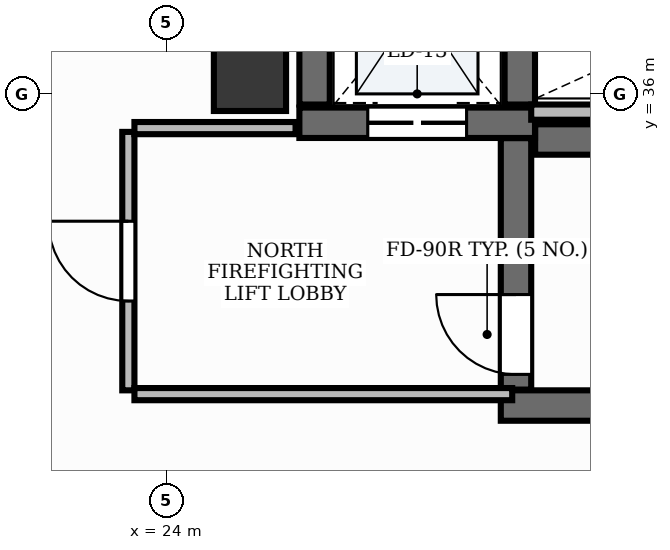
"""IFC4 building model, lengths in metres.
Left out: names, types, materials, properties, quantities, classifications, styles, units other than length and angle.
Written with IfcOpenShell. Run it as: python <this file> out.ifc"""

import sys

from ifc_helpers import new_model, si_unit, direction, frame, frame_2d, origin, origin_2d, place, context, subcontext, project, spatial, rectangle, extrude, element, fill, save


model = new_model("IFC4")
c1 = context("Model", 3, precision=1e-05, world=origin(), true_north=direction((0.0, 1.0)))
c2 = subcontext(c1, "Body", "Model", "MODEL_VIEW")
j1 = project(units=[si_unit("LENGTHUNIT", "METRE"), si_unit("PLANEANGLEUNIT", "RADIAN")], contexts=[c1])
p1 = place(None, origin())
s1 = spatial("IfcSite", under=j1, at=p1, CompositionType="ELEMENT")
p2 = place(p1, origin())
s2 = spatial("IfcBuilding", under=s1, at=p2, CompositionType="ELEMENT")
p3 = place(p2, frame((0.0, 0.0, 247.8)))
s3 = spatial("IfcBuildingStorey", under=s2, at=p3, CompositionType="ELEMENT", Elevation=247.8)
p4 = place(p3, frame((28.852, 35.4, 0.0), z_axis=(0.0, 0.0, 1.0), x_axis=(1.0, 0.0, 0.0)))
e1 = element("IfcWall", 1, at=p4, inside=s3, PredefinedType="SHEAR", context=c2, shape_type="SweptSolid", body=[
    extrude(rectangle(XDim=8.198, YDim=0.4, at=frame_2d((4.099, 0.0))), origin(), (0.0, 0.0, 1.0), 3.9),
])
p5 = place(p3, frame((28.4, 31.9, 0.0), z_axis=(0.0, 0.0, 1.0), x_axis=(1.0, 0.0, 0.0)))
e2 = element("IfcWall", 2, at=p5, inside=s3, PredefinedType="SHEAR", context=c2, shape_type="SweptSolid", body=[
    extrude(rectangle(XDim=8.65, YDim=0.4, at=frame_2d((4.325, 0.0))), origin(), (0.0, 0.0, 1.0), 3.9),
])
p6 = place(p3, frame((28.6, 32.11, 0.0), z_axis=(0.0, 0.0, 1.0), x_axis=(0.0, 1.0, 0.0)))
e3 = element("IfcWall", 3, at=p6, inside=s3, PredefinedType="SHEAR", context=c2, shape_type="SweptSolid", body=[
    extrude(rectangle(XDim=3.308, YDim=0.4, at=frame_2d((1.654, 0.0))), origin(), (0.0, 0.0, 1.0), 3.9),
])
p7 = place(p6, frame((0.2, 0.0, 0.0)))
e4 = element("IfcOpeningElement", 4, at=p7, cuts=e3, PredefinedType="OPENING", context=c2, shape_type="SweptSolid", body=[
    extrude(rectangle(XDim=1.05, YDim=2.15, at=frame_2d((0.525, 1.075))), frame((0.0, 0.215, 0.0), z_axis=(0.0, -1.0, 0.0), x_axis=(1.0, 0.0, 0.0)), (0.0, 0.0, 1.0), 0.43),
])
p8 = place(p3, frame((25.75, 35.62, 0.0), z_axis=(0.0, 0.0, 1.0), x_axis=(1.0, 0.0, 0.0)))
e5 = element("IfcWall", 5, at=p8, inside=s3, PredefinedType="SHEAR", context=c2, shape_type="SweptSolid", body=[
    extrude(rectangle(XDim=3.1, YDim=0.4, at=frame_2d((1.55, 0.0))), origin(), (0.0, 0.0, 1.0), 3.9),
])
p9 = place(p8, frame((0.9, 0.0, 0.0)))
e6 = element("IfcOpeningElement", 6, at=p9, cuts=e5, PredefinedType="OPENING", context=c2, shape_type="SweptSolid", body=[
    extrude(rectangle(XDim=1.3, YDim=2.2, at=frame_2d((0.65, 1.1))), frame((0.0, 0.215, 0.0), z_axis=(0.0, -1.0, 0.0), x_axis=(1.0, 0.0, 0.0)), (0.0, 0.0, 1.0), 0.43),
])
for number, where, z_axis, x_axis in (
    (7, (25.95, 35.86, 0.0), (0.0, 0.0, 1.0), (0.0, 1.0, 0.0)),
    (8, (28.65, 35.86, 0.0), (0.0, 0.0, 1.0), (0.0, 1.0, 0.0)),
):
    element("IfcWall", number, at=place(p3, frame(where, z_axis=z_axis, x_axis=x_axis)), inside=s3, PredefinedType="SHEAR", context=c2, shape_type="SweptSolid", body=[
        extrude(rectangle(XDim=2.7, YDim=0.4, at=frame_2d((1.35, 0.0))), origin(), (0.0, 0.0, 1.0), 3.9),
    ])
p10 = place(p3, frame((25.1, 36.25, -0.0), z_axis=(0.0, 0.0, 1.0), x_axis=(1.0, 0.0, 0.0)))
e9 = element("IfcColumn", 9, at=p10, inside=s3, PredefinedType="PILASTER", context=c2, shape_type="SweptSolid", body=[
    extrude(rectangle(XDim=0.95, YDim=0.95, at=origin_2d()), origin(), (0.0, 0.0, 1.0), 3.901),
])
p11 = place(p3, frame((28.8, 35.76, 0.0), z_axis=(0.0, 0.0, 1.0), x_axis=(1.0, 0.0, 0.0)))
e10 = element("IfcWall", 10, at=p11, inside=s3, PredefinedType="PARTITIONING", context=c2, shape_type="SweptSolid", body=[
    extrude(rectangle(XDim=4.57, YDim=0.2, at=frame_2d((2.285, 0.0))), origin(), (0.0, 0.0, 1.0), 2.91),
])
p12 = place(p3, frame((23.5, 32.1, 0.0), z_axis=(0.0, 0.0, 1.0), x_axis=(0.0, 1.0, 0.0)))
e11 = element("IfcWall", 11, at=p12, inside=s3, PredefinedType="PARTITIONING", context=c2, shape_type="SweptSolid", body=[
    extrude(rectangle(XDim=3.4, YDim=0.16, at=frame_2d((1.7, 0.0))), origin(), (0.0, 0.0, 1.0), 2.91),
])
p13 = place(p12, frame((1.175, 0.0, 0.0)))
e12 = element("IfcOpeningElement", 12, at=p13, cuts=e11, PredefinedType="OPENING", context=c2, shape_type="SweptSolid", body=[
    extrude(rectangle(XDim=1.05, YDim=2.15, at=frame_2d((0.525, 1.075))), frame((0.0, 0.095, 0.0), z_axis=(0.0, -1.0, 0.0), x_axis=(1.0, 0.0, 0.0)), (0.0, 0.0, 1.0), 0.19),
])
p14 = place(p3, frame((23.58, 32.05, 0.0), z_axis=(0.0, 0.0, 1.0), x_axis=(1.0, 0.0, 0.0)))
e13 = element("IfcWall", 13, at=p14, inside=s3, PredefinedType="PARTITIONING", context=c2, shape_type="SweptSolid", body=[
    extrude(rectangle(XDim=4.97, YDim=0.16, at=frame_2d((2.485, 0.0))), origin(), (0.0, 0.0, 1.0), 2.91),
])
p15 = place(p3, frame((23.58, 35.55, 0.0), z_axis=(0.0, 0.0, 1.0), x_axis=(1.0, 0.0, 0.0)))
e14 = element("IfcWall", 14, at=p15, inside=s3, PredefinedType="PARTITIONING", context=c2, shape_type="SweptSolid", body=[
    extrude(rectangle(XDim=2.12, YDim=0.16, at=frame_2d((1.06, 0.0))), origin(), (0.0, 0.0, 1.0), 2.91),
])
p16 = place(p7, origin())
e15 = element("IfcDoor", 15, at=p16, inside=s3, OperationType="SINGLE_SWING_RIGHT", PredefinedType="DOOR", context=c2, shape_type="SweptSolid", body=[
    extrude(rectangle(XDim=1.05, YDim=2.15, at=frame_2d((0.525, 1.075))), frame((0.0, 0.025, 0.0), z_axis=(0.0, -1.0, 0.0), x_axis=(1.0, 0.0, 0.0)), (0.0, 0.0, 1.0), 0.05),
])
fill(e4, e15)
p17 = place(p9, origin())
e16 = element("IfcDoor", 16, at=p17, inside=s3, OperationType="DOUBLE_DOOR_SLIDING", PredefinedType="DOOR", context=c2, shape_type="SweptSolid", body=[
    extrude(rectangle(XDim=1.3, YDim=2.2, at=frame_2d((0.65, 1.1))), frame((0.0, 0.025, 0.0), z_axis=(0.0, -1.0, 0.0), x_axis=(1.0, 0.0, 0.0)), (0.0, 0.0, 1.0), 0.05),
])
fill(e6, e16)
p18 = place(p13, origin())
e17 = element("IfcDoor", 17, at=p18, inside=s3, OperationType="SINGLE_SWING_RIGHT", PredefinedType="DOOR", context=c2, shape_type="SweptSolid", body=[
    extrude(rectangle(XDim=1.05, YDim=2.15, at=frame_2d((0.525, 1.075))), frame((0.0, 0.025, 0.0), z_axis=(0.0, -1.0, 0.0), x_axis=(1.0, 0.0, 0.0)), (0.0, 0.0, 1.0), 0.05),
])
fill(e12, e17)
save(model, sys.argv[1])
